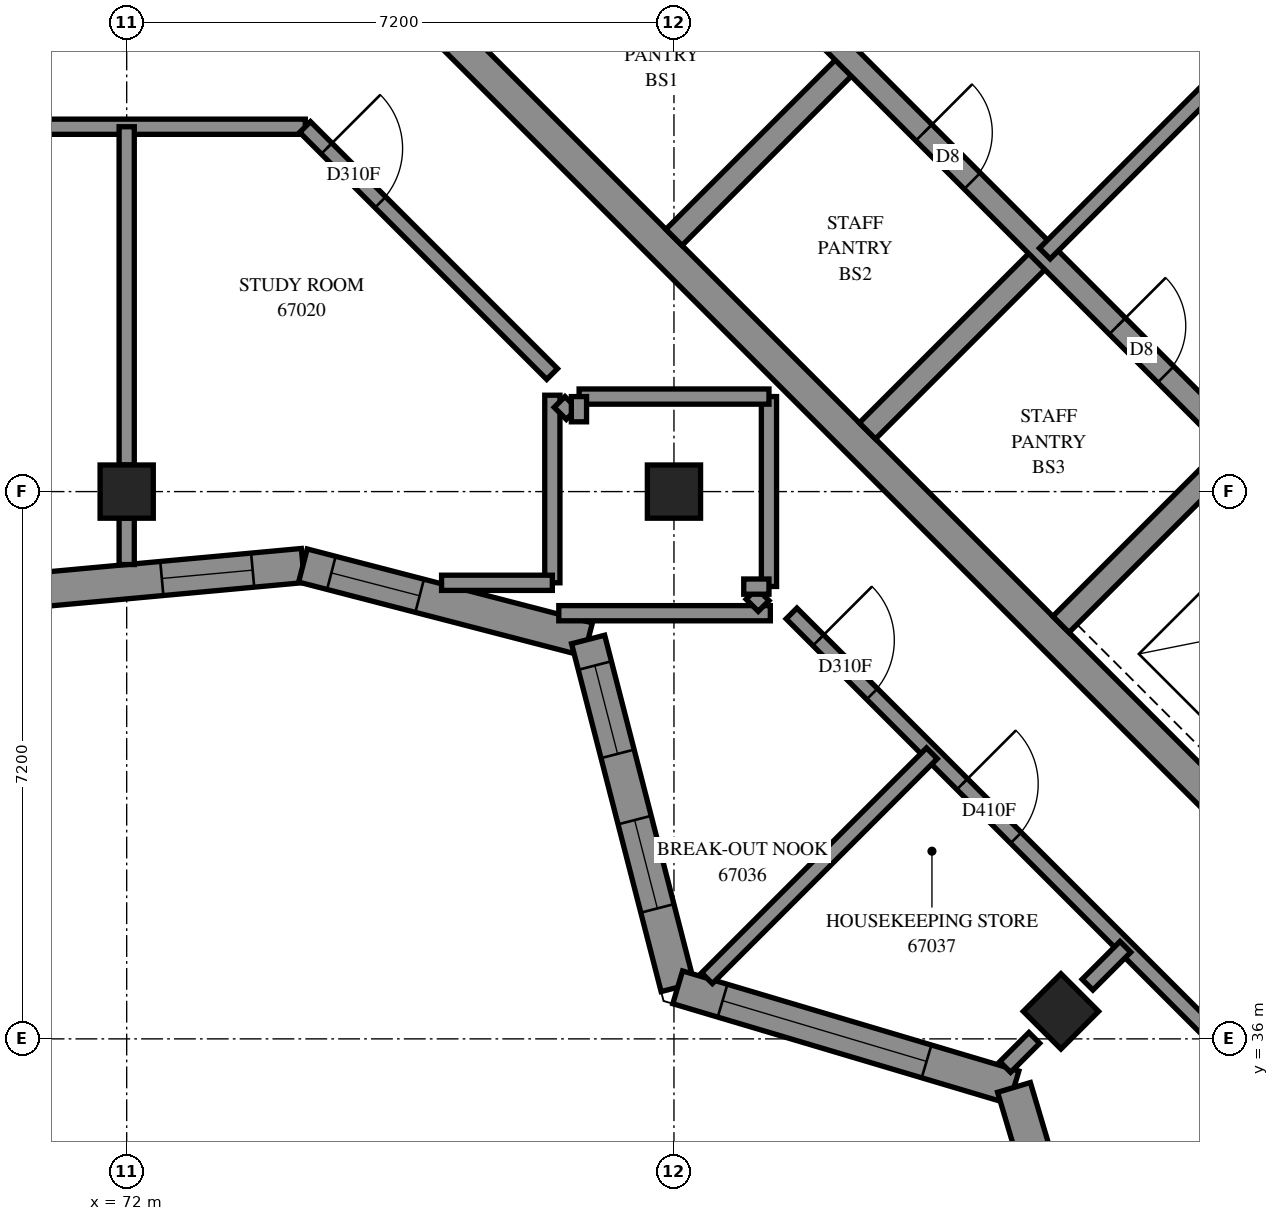
"""IFC4 building model, lengths in metres.
Left out: names, types, materials, properties, quantities, classifications, styles, units other than length and angle.
Written with IfcOpenShell. Run it as: python <this file> out.ifc"""

import sys

from ifc_helpers import new_model, si_unit, direction, frame, frame_2d, origin, origin_2d, place, context, subcontext, project, spatial, polyline, rectangle, outline, extrude, element, fill, save


model = new_model("IFC4")
c1 = context("Model", 3, precision=1e-05, world=origin(), true_north=direction((0.0, 1.0)))
c2 = subcontext(c1, "Body", "Model", "MODEL_VIEW")
j1 = project(units=[si_unit("LENGTHUNIT", "METRE"), si_unit("PLANEANGLEUNIT", "RADIAN")], contexts=[c1])
p1 = place(None, origin())
s1 = spatial("IfcSite", under=j1, at=p1, CompositionType="ELEMENT")
p2 = place(p1, origin())
s2 = spatial("IfcBuilding", under=s1, at=p2, CompositionType="ELEMENT")
p3 = place(p2, frame((0.0, 0.0, 247.2)))
s3 = spatial("IfcBuildingStorey", under=s2, at=p3, CompositionType="ELEMENT", Elevation=247.2)
for number, where, z_axis, x_axis in (
    (1, (72.0, 43.2, 0.0), (0.0, 0.0, 1.0), (1.0, 0.0, 0.0)),
    (2, (79.2, 43.2, 0.0), (0.0, 0.0, 1.0), (1.0, 0.0, 0.0)),
    (3, (84.291, 36.362, 0.0), (0.0, 0.0, 1.0), (0.707, -0.707, 0.0)),
):
    element("IfcColumn", number, at=place(p3, frame(where, z_axis=z_axis, x_axis=x_axis)), inside=s3, PredefinedType="COLUMN", context=c2, shape_type="SweptSolid", body=[
        extrude(rectangle(XDim=0.7, YDim=0.7, at=origin_2d()), origin(), (0.0, 0.0, 1.0), 3.1),
    ])
p4 = place(p3, frame((76.23, 49.231, -0.3), z_axis=(0.0, 0.0, 1.0), x_axis=(0.7071034917, -0.7071100706, 0.0)))
e4 = element("IfcWall", 4, at=p4, inside=s3, PredefinedType="SHEAR", context=c2, shape_type="SweptSolid", body=[
    extrude(rectangle(XDim=15.2, YDim=0.4, at=frame_2d((7.6, 0.0))), origin(), (0.0, 0.0, 1.0), 2.7),
])
p5 = place(p3, frame((79.2, 46.544, 0.0), z_axis=(0.0, 0.0, 1.0), x_axis=(0.7071219326, 0.7070916295, 0.0)))
e5 = element("IfcWall", 5, at=p5, inside=s3, PredefinedType="SOLIDWALL", context=c2, shape_type="SweptSolid", body=[
    extrude(rectangle(XDim=3.3, YDim=0.3, at=frame_2d((1.65, 0.0))), origin(), (0.0, 0.0, 1.0), 3.1),
])
for number, where, z_axis, x_axis in (
    (6, (81.746, 43.999, 0.0), (0.0, 0.0, 1.0), (0.707, 0.707, 0.0)),
    (7, (84.291, 41.453, 0.0), (0.0, 0.0, 1.0), (0.707, 0.707, 0.0)),
):
    element("IfcWall", number, at=place(p3, frame(where, z_axis=z_axis, x_axis=x_axis)), inside=s3, PredefinedType="SOLIDWALL", context=c2, shape_type="SweptSolid", body=[
        extrude(rectangle(XDim=3.3, YDim=0.3, at=frame_2d((1.65, 0.0))), origin(), (0.0, 0.0, 1.0), 3.1),
    ])
p6 = place(p3, frame((78.988, 51.423, 0.0), z_axis=(0.0, 0.0, 1.0), x_axis=(0.7071067812, -0.7071067812, 0.0)))
e8 = element("IfcWall", 8, at=p6, inside=s3, PredefinedType="SOLIDWALL", context=c2, shape_type="SweptSolid", body=[
    extrude(rectangle(XDim=14.4, YDim=0.3, at=frame_2d((7.2, 0.0))), origin(), (0.0, 0.0, 1.0), 3.1),
])
p7 = place(p6, frame((1.35, 0.0, 0.0)))
e9 = element("IfcOpeningElement", 9, at=p7, cuts=e8, PredefinedType="OPENING", context=c2, shape_type="SweptSolid", body=[
    extrude(rectangle(XDim=0.9, YDim=2.1, at=frame_2d((0.45, 1.05))), frame((0.0, 0.16, 0.0), z_axis=(0.0, -1.0, 0.0), x_axis=(1.0, 0.0, 0.0)), (0.0, 0.0, 1.0), 0.32),
])
p8 = place(p6, frame((4.95, 0.0, 0.0)))
e10 = element("IfcOpeningElement", 10, at=p8, cuts=e8, PredefinedType="OPENING", context=c2, shape_type="SweptSolid", body=[
    extrude(rectangle(XDim=0.9, YDim=2.1, at=frame_2d((0.45, 1.05))), frame((0.0, 0.16, 0.0), z_axis=(0.0, -1.0, 0.0), x_axis=(1.0, 0.0, 0.0)), (0.0, 0.0, 1.0), 0.32),
])
p9 = place(p6, frame((8.55, 0.0, 0.0)))
e11 = element("IfcOpeningElement", 11, at=p9, cuts=e8, PredefinedType="OPENING", context=c2, shape_type="SweptSolid", body=[
    extrude(rectangle(XDim=0.9, YDim=2.1, at=frame_2d((0.45, 1.05))), frame((0.0, 0.16, 0.0), z_axis=(0.0, -1.0, 0.0), x_axis=(1.0, 0.0, 0.0)), (0.0, 0.0, 1.0), 0.32),
])
p10 = place(p6, frame((12.05, 0.0, 0.0)))
e12 = element("IfcOpeningElement", 12, at=p10, cuts=e8, PredefinedType="OPENING", context=c2, shape_type="SweptSolid", body=[
    extrude(rectangle(XDim=1.1, YDim=2.1, at=frame_2d((0.55, 1.05))), frame((0.0, 0.16, 0.0), z_axis=(0.0, -1.0, 0.0), x_axis=(1.0, 0.0, 0.0)), (0.0, 0.0, 1.0), 0.32),
])
p11 = place(p3, frame((81.534, 53.969, 0.0), z_axis=(0.0, 0.0, 1.0), x_axis=(0.707103309, -0.7071102534, 0.0)))
e13 = element("IfcWall", 13, at=p11, inside=s3, PredefinedType="SOLIDWALL", context=c2, shape_type="SweptSolid", body=[
    extrude(rectangle(XDim=14.4, YDim=0.3, at=frame_2d((7.2, 0.0))), origin(), (0.0, 0.0, 1.0), 3.1),
])
p12 = place(p11, frame((8.55, 0.0, 0.0)))
e14 = element("IfcOpeningElement", 14, at=p12, cuts=e13, PredefinedType="OPENING", context=c2, shape_type="SweptSolid", body=[
    extrude(rectangle(XDim=0.9, YDim=2.1, at=frame_2d((0.45, 1.05))), frame((0.0, 0.16, 0.0), z_axis=(0.0, -1.0, 0.0), x_axis=(1.0, 0.0, 0.0)), (0.0, 0.0, 1.0), 0.32),
])
p13 = place(p11, frame((1.25, 0.0, 0.0)))
e15 = element("IfcOpeningElement", 15, at=p13, cuts=e13, PredefinedType="OPENING", context=c2, shape_type="SweptSolid", body=[
    extrude(rectangle(XDim=1.1, YDim=2.1, at=frame_2d((0.55, 1.05))), frame((0.0, 0.16, 0.0), z_axis=(0.0, -1.0, 0.0), x_axis=(1.0, 0.0, 0.0)), (0.0, 0.0, 1.0), 0.32),
])
p14 = place(p11, frame((4.85, 0.0, 0.0)))
e16 = element("IfcOpeningElement", 16, at=p14, cuts=e13, PredefinedType="OPENING", context=c2, shape_type="SweptSolid", body=[
    extrude(rectangle(XDim=1.1, YDim=2.1, at=frame_2d((0.55, 1.05))), frame((0.0, 0.16, 0.0), z_axis=(0.0, -1.0, 0.0), x_axis=(1.0, 0.0, 0.0)), (0.0, 0.0, 1.0), 0.32),
])
p15 = place(p11, frame((12.05, 0.0, 0.0)))
e17 = element("IfcOpeningElement", 17, at=p15, cuts=e13, PredefinedType="OPENING", context=c2, shape_type="SweptSolid", body=[
    extrude(rectangle(XDim=1.1, YDim=2.1, at=frame_2d((0.55, 1.05))), frame((0.0, 0.16, 0.0), z_axis=(0.0, -1.0, 0.0), x_axis=(1.0, 0.0, 0.0)), (0.0, 0.0, 1.0), 0.32),
])
p16 = place(p3, frame((70.714, 41.896, 0.0), z_axis=(0.0, 0.0, 1.0), x_axis=(0.9957918129, 0.0916442329, 0.0)))
e18 = element("IfcWall", 18, at=p16, inside=s3, PredefinedType="SOLIDWALL", context=c2, shape_type="SweptSolid", body=[
    extrude(outline(polyline([(-0.021, -0.225), (3.58, -0.225), (3.659, 0.225), (0.021, 0.225), (-0.021, -0.225)])), origin(), (0.0, 0.0, 1.0), 3.1),
])
p17 = place(p16, frame((1.755, 0.0, 0.45)))
e19 = element("IfcOpeningElement", 19, at=p17, cuts=e18, PredefinedType="OPENING", context=c2, shape_type="SweptSolid", body=[
    extrude(rectangle(XDim=1.2, YDim=2.55, at=frame_2d((0.6, 1.275))), frame((0.0, 0.235, 0.0), z_axis=(0.0, -1.0, 0.0), x_axis=(1.0, 0.0, 0.0)), (0.0, 0.0, 1.0), 0.47),
])
p18 = place(p3, frame((74.319, 42.228, 0.0), z_axis=(0.0, 0.0, 1.0), x_axis=(0.9679697349, -0.2510669081, 0.0)))
e20 = element("IfcWall", 20, at=p18, inside=s3, PredefinedType="SOLIDWALL", context=c2, shape_type="SweptSolid", body=[
    extrude(outline(polyline([(0.039, -0.225), (3.744, -0.225), (4.009, 0.225), (-0.039, 0.225), (0.039, -0.225)])), origin(), (0.0, 0.0, 1.0), 3.1),
])
p19 = place(p18, frame((0.387, 0.0, 0.45)))
e21 = element("IfcOpeningElement", 21, at=p19, cuts=e20, PredefinedType="OPENING", context=c2, shape_type="SweptSolid", body=[
    extrude(rectangle(XDim=1.2, YDim=2.55, at=frame_2d((0.6, 1.275))), frame((0.0, 0.235, 0.0), z_axis=(0.0, -1.0, 0.0), x_axis=(1.0, 0.0, 0.0)), (0.0, 0.0, 1.0), 0.47),
])
p20 = place(p3, frame((78.071, 41.255, 0.0), z_axis=(0.0, 0.0, 1.0), x_axis=(0.2493659813, -0.9684093181, 0.0)))
e22 = element("IfcWall", 22, at=p20, inside=s3, PredefinedType="SOLIDWALL", context=c2, shape_type="SweptSolid", body=[
    extrude(outline(polyline([(0.133, -0.225), (4.853, -0.225), (4.598, 0.225), (-0.133, 0.225), (0.133, -0.225)])), origin(), (0.0, 0.0, 1.0), 3.1),
])
p21 = place(p20, frame((0.354, 0.0, 0.45)))
e23 = element("IfcOpeningElement", 23, at=p21, cuts=e22, PredefinedType="OPENING", context=c2, shape_type="SweptSolid", body=[
    extrude(rectangle(XDim=1.2, YDim=2.55, at=frame_2d((0.6, 1.275))), frame((0.0, 0.235, 0.0), z_axis=(0.0, -1.0, 0.0), x_axis=(1.0, 0.0, 0.0)), (0.0, 0.0, 1.0), 0.47),
])
p22 = place(p20, frame((2.453, 0.0, 0.45)))
e24 = element("IfcOpeningElement", 24, at=p22, cuts=e22, PredefinedType="OPENING", context=c2, shape_type="SweptSolid", body=[
    extrude(rectangle(XDim=1.2, YDim=2.55, at=frame_2d((0.6, 1.275))), frame((0.0, 0.235, 0.0), z_axis=(0.0, -1.0, 0.0), x_axis=(1.0, 0.0, 0.0)), (0.0, 0.0, 1.0), 0.47),
])
p23 = place(p3, frame((79.249, 36.678, 0.0), z_axis=(0.0, 0.0, 1.0), x_axis=(0.9584470724, -0.2852704146, 0.0)))
e25 = element("IfcWall", 25, at=p23, inside=s3, PredefinedType="SOLIDWALL", context=c2, shape_type="SweptSolid", body=[
    extrude(outline(polyline([(-0.127, -0.225), (4.495, -0.225), (4.738, 0.225), (0.127, 0.225), (-0.127, -0.225)])), origin(), (0.0, 0.0, 1.0), 3.1),
])
p24 = place(p23, frame((0.616, 0.0, 0.45)))
e26 = element("IfcOpeningElement", 26, at=p24, cuts=e25, PredefinedType="OPENING", context=c2, shape_type="SweptSolid", body=[
    extrude(rectangle(XDim=2.8, YDim=2.55, at=frame_2d((1.4, 1.275))), frame((0.0, 0.235, 0.0), z_axis=(0.0, -1.0, 0.0), x_axis=(1.0, 0.0, 0.0)), (0.0, 0.0, 1.0), 0.47),
])
p25 = place(p3, frame((83.674, 35.361, 0.0), z_axis=(0.0, 0.0, 1.0), x_axis=(0.2852704146, -0.9584470724, 0.0)))
e27 = element("IfcWall", 27, at=p25, inside=s3, PredefinedType="SOLIDWALL", context=c2, shape_type="SweptSolid", body=[
    extrude(outline(polyline([(0.122, -0.225), (4.744, -0.225), (4.489, 0.225), (-0.122, 0.225), (0.122, -0.225)])), origin(), (0.0, 0.0, 1.0), 3.1),
])
p26 = place(p25, frame((1.045, 0.0, 0.45)))
e28 = element("IfcOpeningElement", 28, at=p26, cuts=e27, PredefinedType="OPENING", context=c2, shape_type="SweptSolid", body=[
    extrude(rectangle(XDim=1.2, YDim=2.55, at=frame_2d((0.6, 1.275))), frame((0.0, 0.235, 0.0), z_axis=(0.0, -1.0, 0.0), x_axis=(1.0, 0.0, 0.0)), (0.0, 0.0, 1.0), 0.47),
])
p27 = place(p3, frame((84.079, 46.332, 0.0), z_axis=(0.0, 0.0, 1.0), x_axis=(0.7071067812, 0.7071067812, 0.0)))
e29 = element("IfcWall", 29, at=p27, inside=s3, PredefinedType="PARTITIONING", context=c2, shape_type="SweptSolid", body=[
    extrude(rectangle(XDim=3.6, YDim=0.2, at=frame_2d((1.8, 0.0))), origin(), (0.0, 0.0, 1.0), 3.1),
])
p28 = place(p3, frame((55.2, 48.0, 0.0), z_axis=(0.0, 0.0, 1.0), x_axis=(1.0, 0.0, 0.0)))
e30 = element("IfcWall", 30, at=p28, inside=s3, PredefinedType="PARTITIONING", context=c2, shape_type="SweptSolid", body=[
    extrude(rectangle(XDim=19.15, YDim=0.2, at=frame_2d((9.575, 0.0))), origin(), (0.0, 0.0, 1.0), 3.1),
])
p29 = place(p28, frame((6.299, 0.0, 0.0)))
e31 = element("IfcOpeningElement", 31, at=p29, cuts=e30, PredefinedType="OPENING", context=c2, shape_type="SweptSolid", body=[
    extrude(rectangle(XDim=0.9, YDim=2.1, at=frame_2d((0.45, 1.05))), frame((0.0, 0.11, 0.0), z_axis=(0.0, -1.0, 0.0), x_axis=(1.0, 0.0, 0.0)), (0.0, 0.0, 1.0), 0.22),
])
p30 = place(p28, frame((13.499, 0.0, 0.0)))
e32 = element("IfcOpeningElement", 32, at=p30, cuts=e30, PredefinedType="OPENING", context=c2, shape_type="SweptSolid", body=[
    extrude(rectangle(XDim=0.9, YDim=2.1, at=frame_2d((0.45, 1.05))), frame((0.0, 0.11, 0.0), z_axis=(0.0, -1.0, 0.0), x_axis=(1.0, 0.0, 0.0)), (0.0, 0.0, 1.0), 0.22),
])
p31 = place(p3, frame((84.934, 31.915, 0.0), z_axis=(0.0, 0.0, 1.0), x_axis=(0.7071067812, 0.7071067812, 0.0)))
e33 = element("IfcWall", 33, at=p31, inside=s3, PredefinedType="PARTITIONING", context=c2, shape_type="SweptSolid", body=[
    extrude(rectangle(XDim=11.29, YDim=0.2, at=frame_2d((5.645, 0.0))), origin(), (0.0, 0.0, 1.0), 3.1),
])
p32 = place(p3, frame((80.747, 41.597, 0.0), z_axis=(0.0, 0.0, 1.0), x_axis=(0.7071067812, -0.7071067812, 0.0)))
e34 = element("IfcWall", 34, at=p32, inside=s3, PredefinedType="PARTITIONING", context=c2, shape_type="SweptSolid", body=[
    extrude(rectangle(XDim=8.607, YDim=0.2, at=frame_2d((4.303, 0.0))), origin(), (0.0, 0.0, 1.0), 3.1),
])
p33 = place(p32, frame((0.498, 0.0, 0.0)))
e35 = element("IfcOpeningElement", 35, at=p33, cuts=e34, PredefinedType="OPENING", context=c2, shape_type="SweptSolid", body=[
    extrude(rectangle(XDim=1.0, YDim=2.1, at=frame_2d((0.5, 1.05))), frame((0.0, 0.11, 0.0), z_axis=(0.0, -1.0, 0.0), x_axis=(1.0, 0.0, 0.0)), (0.0, 0.0, 1.0), 0.22),
])
p34 = place(p32, frame((3.175, 0.0, 0.0)))
e36 = element("IfcOpeningElement", 36, at=p34, cuts=e34, PredefinedType="OPENING", context=c2, shape_type="SweptSolid", body=[
    extrude(rectangle(XDim=1.0, YDim=2.1, at=frame_2d((0.5, 1.05))), frame((0.0, 0.11, 0.0), z_axis=(0.0, -1.0, 0.0), x_axis=(1.0, 0.0, 0.0)), (0.0, 0.0, 1.0), 0.22),
])
p35 = place(p3, frame((74.347, 47.997, 0.0), z_axis=(0.0, 0.0, 1.0), x_axis=(0.7071067812, -0.7071067812, 0.0)))
e37 = element("IfcWall", 37, at=p35, inside=s3, PredefinedType="PARTITIONING", context=c2, shape_type="SweptSolid", body=[
    extrude(rectangle(XDim=4.596, YDim=0.2, at=frame_2d((2.298, 0.0))), origin(), (0.0, 0.0, 1.0), 3.1),
])
p36 = place(p35, frame((0.401, 0.0, 0.0)))
e38 = element("IfcOpeningElement", 38, at=p36, cuts=e37, PredefinedType="OPENING", context=c2, shape_type="SweptSolid", body=[
    extrude(rectangle(XDim=1.0, YDim=2.1, at=frame_2d((0.5, 1.05))), frame((0.0, 0.11, 0.0), z_axis=(0.0, -1.0, 0.0), x_axis=(1.0, 0.0, 0.0)), (0.0, 0.0, 1.0), 0.22),
])
p37 = place(p3, frame((72.0, 43.55, 0.0), z_axis=(0.0, 0.0, 1.0), x_axis=(0.0, 1.0, 0.0)))
e39 = element("IfcWall", 39, at=p37, inside=s3, PredefinedType="PARTITIONING", context=c2, shape_type="SweptSolid", body=[
    extrude(rectangle(XDim=4.45, YDim=0.2, at=frame_2d((2.225, 0.0))), origin(), (0.0, 0.0, 1.0), 3.1),
])
p38 = place(p3, frame((79.635, 36.798, 0.0), z_axis=(0.0, 0.0, 1.0), x_axis=(0.7071187313, 0.7070948309, 0.0)))
e40 = element("IfcWall", 40, at=p38, inside=s3, PredefinedType="PARTITIONING", context=c2, shape_type="SweptSolid", body=[
    extrude(rectangle(XDim=4.184, YDim=0.2, at=frame_2d((2.092, 0.0))), origin(), (0.0, 0.0, 1.0), 3.1),
])
p39 = place(p3, frame((77.685, 41.6, 0.0), z_axis=(0.0, 0.0, 1.0), x_axis=(1.0, 0.0, 0.0)))
e41 = element("IfcWall", 41, at=p39, inside=s3, PredefinedType="PARTITIONING", context=c2, shape_type="SweptSolid", body=[
    extrude(rectangle(XDim=2.783, YDim=0.2, at=frame_2d((1.392, 0.0))), origin(), (0.0, 0.0, 1.0), 3.1),
])
for number, where, z_axis, x_axis in (
    (42, (80.45, 41.952, 0.0), (0.0, 0.0, 1.0), (0.0, 1.0, 0.0)),
    (43, (77.952, 44.45, 0.0), (0.0, 0.0, 1.0), (1.0, 0.0, 0.0)),
):
    element("IfcWall", number, at=place(p3, frame(where, z_axis=z_axis, x_axis=x_axis)), inside=s3, PredefinedType="PARTITIONING", context=c2, shape_type="SweptSolid", body=[
        extrude(rectangle(XDim=2.498, YDim=0.2, at=frame_2d((1.249, 0.0))), origin(), (0.0, 0.0, 1.0), 3.1),
    ])
p40 = place(p3, frame((77.6, 42.0, 0.0), z_axis=(0.0, 0.0, 1.0), x_axis=(0.0, 1.0, 0.0)))
e44 = element("IfcWall", 44, at=p40, inside=s3, PredefinedType="PARTITIONING", context=c2, shape_type="SweptSolid", body=[
    extrude(rectangle(XDim=2.468, YDim=0.2, at=frame_2d((1.234, 0.0))), origin(), (0.0, 0.0, 1.0), 3.1),
])
p41 = place(p3, frame((76.143, 42.0, 0.0), z_axis=(0.0, 0.0, 1.0), x_axis=(1.0, 0.0, 0.0)))
e45 = element("IfcWall", 45, at=p41, inside=s3, PredefinedType="PARTITIONING", context=c2, shape_type="SweptSolid", body=[
    extrude(rectangle(XDim=1.457, YDim=0.2, at=frame_2d((0.729, 0.0))), origin(), (0.0, 0.0, 1.0), 3.1),
])
p42 = place(p3, frame((84.641, 36.713, 0.0), z_axis=(0.0, 0.0, 1.0), x_axis=(0.7071067812, 0.7071067812, 0.0)))
e46 = element("IfcWall", 46, at=p42, inside=s3, PredefinedType="PARTITIONING", context=c2, shape_type="SweptSolid", body=[
    extrude(rectangle(XDim=0.704, YDim=0.2, at=frame_2d((0.352, 0.0))), origin(), (0.0, 0.0, 1.0), 3.1),
])
p43 = place(p3, frame((72.0, 42.24, 0.0), z_axis=(0.0, 0.0, 1.0), x_axis=(0.0, 1.0, 0.0)))
e47 = element("IfcWall", 47, at=p43, inside=s3, PredefinedType="PARTITIONING", context=c2, shape_type="SweptSolid", body=[
    extrude(rectangle(XDim=0.61, YDim=0.2, at=frame_2d((0.305, 0.0))), origin(), (0.0, 0.0, 1.0), 3.1),
])
for number, where, z_axis, x_axis in (
    (48, (80.221, 41.855, 0.0), (0.0, 0.0, 1.0), (0.707, -0.707, 0.0)),
    (49, (77.695, 44.38, 0.0), (0.0, 0.0, 1.0), (0.707, -0.707, 0.0)),
):
    element("IfcWall", number, at=place(p3, frame(where, z_axis=z_axis, x_axis=x_axis)), inside=s3, PredefinedType="PARTITIONING", context=c2, shape_type="SweptSolid", body=[
        extrude(rectangle(XDim=0.225, YDim=0.2, at=frame_2d((0.112, 0.0))), origin(), (0.0, 0.0, 1.0), 3.1),
    ])
p44 = place(p3, frame((83.558, 35.63, 0.0), z_axis=(0.0, 0.0, 1.0), x_axis=(0.7070144033, 0.707199147, 0.0)))
e50 = element("IfcWall", 50, at=p44, inside=s3, PredefinedType="PARTITIONING", context=c2, shape_type="SweptSolid", body=[
    extrude(rectangle(XDim=0.541, YDim=0.2, at=frame_2d((0.271, 0.0))), origin(), (0.0, 0.0, 1.0), 3.1),
])
for number, where, z_axis, x_axis in (
    (51, (80.118, 41.95, 0.0), (0.0, 0.0, 1.0), (1.0, 0.0, 0.0)),
    (52, (77.95, 44.118, 0.0), (0.0, 0.0, 1.0), (0.0, 1.0, 0.0)),
):
    element("IfcWall", number, at=place(p3, frame(where, z_axis=z_axis, x_axis=x_axis)), inside=s3, PredefinedType="PARTITIONING", context=c2, shape_type="SweptSolid", body=[
        extrude(rectangle(XDim=0.332, YDim=0.2, at=frame_2d((0.166, 0.0))), origin(), (0.0, 0.0, 1.0), 3.1),
    ])
p45 = place(p17, origin())
e53 = element("IfcWindow", 53, at=p45, inside=s3, PartitioningType="SINGLE_PANEL", PredefinedType="WINDOW", context=c2, shape_type="SweptSolid", body=[
    extrude(rectangle(XDim=1.2, YDim=2.55, at=frame_2d((0.6, 1.275))), frame((0.0, 0.205, 0.0), z_axis=(0.0, -1.0, 0.0), x_axis=(1.0, 0.0, 0.0)), (0.0, 0.0, 1.0), 0.06),
])
fill(e19, e53)
p46 = place(p21, origin())
e54 = element("IfcWindow", 54, at=p46, inside=s3, PartitioningType="SINGLE_PANEL", PredefinedType="WINDOW", context=c2, shape_type="SweptSolid", body=[
    extrude(rectangle(XDim=1.2, YDim=2.55, at=frame_2d((0.6, 1.275))), frame((0.0, 0.205, 0.0), z_axis=(0.0, -1.0, 0.0), x_axis=(1.0, 0.0, 0.0)), (0.0, 0.0, 1.0), 0.06),
])
fill(e23, e54)
p47 = place(p22, origin())
e55 = element("IfcWindow", 55, at=p47, inside=s3, PartitioningType="SINGLE_PANEL", PredefinedType="WINDOW", context=c2, shape_type="SweptSolid", body=[
    extrude(rectangle(XDim=1.2, YDim=2.55, at=frame_2d((0.6, 1.275))), frame((0.0, 0.205, 0.0), z_axis=(0.0, -1.0, 0.0), x_axis=(1.0, 0.0, 0.0)), (0.0, 0.0, 1.0), 0.06),
])
fill(e24, e55)
p48 = place(p24, origin())
e56 = element("IfcWindow", 56, at=p48, inside=s3, PartitioningType="SINGLE_PANEL", PredefinedType="WINDOW", context=c2, shape_type="SweptSolid", body=[
    extrude(rectangle(XDim=2.8, YDim=2.55, at=frame_2d((1.4, 1.275))), frame((0.0, 0.205, 0.0), z_axis=(0.0, -1.0, 0.0), x_axis=(1.0, 0.0, 0.0)), (0.0, 0.0, 1.0), 0.06),
])
fill(e26, e56)
p49 = place(p8, origin())
e57 = element("IfcDoor", 57, at=p49, inside=s3, OperationType="SINGLE_SWING_LEFT", PredefinedType="DOOR", context=c2, shape_type="SweptSolid", body=[
    extrude(rectangle(XDim=0.9, YDim=2.1, at=frame_2d((0.45, 1.05))), frame((0.0, 0.025, 0.0), z_axis=(0.0, -1.0, 0.0), x_axis=(1.0, 0.0, 0.0)), (0.0, 0.0, 1.0), 0.05),
])
fill(e10, e57)
p50 = place(p9, origin())
e58 = element("IfcDoor", 58, at=p50, inside=s3, OperationType="SINGLE_SWING_LEFT", PredefinedType="DOOR", context=c2, shape_type="SweptSolid", body=[
    extrude(rectangle(XDim=0.9, YDim=2.1, at=frame_2d((0.45, 1.05))), frame((0.0, 0.025, 0.0), z_axis=(0.0, -1.0, 0.0), x_axis=(1.0, 0.0, 0.0)), (0.0, 0.0, 1.0), 0.05),
])
fill(e11, e58)
p51 = place(p36, origin())
e59 = element("IfcDoor", 59, at=p51, inside=s3, OperationType="SINGLE_SWING_LEFT", PredefinedType="DOOR", context=c2, shape_type="SweptSolid", body=[
    extrude(rectangle(XDim=1.0, YDim=2.1, at=frame_2d((0.5, 1.05))), frame((0.0, 0.025, 0.0), z_axis=(0.0, -1.0, 0.0), x_axis=(1.0, 0.0, 0.0)), (0.0, 0.0, 1.0), 0.05),
])
fill(e38, e59)
p52 = place(p33, origin())
e60 = element("IfcDoor", 60, at=p52, inside=s3, OperationType="SINGLE_SWING_RIGHT", PredefinedType="DOOR", context=c2, shape_type="SweptSolid", body=[
    extrude(rectangle(XDim=1.0, YDim=2.1, at=frame_2d((0.5, 1.05))), frame((0.0, 0.025, 0.0), z_axis=(0.0, -1.0, 0.0), x_axis=(1.0, 0.0, 0.0)), (0.0, 0.0, 1.0), 0.05),
])
fill(e35, e60)
p53 = place(p34, origin())
e61 = element("IfcDoor", 61, at=p53, inside=s3, OperationType="SINGLE_SWING_LEFT", PredefinedType="DOOR", context=c2, shape_type="SweptSolid", body=[
    extrude(rectangle(XDim=1.0, YDim=2.1, at=frame_2d((0.5, 1.05))), frame((0.0, 0.025, 0.0), z_axis=(0.0, -1.0, 0.0), x_axis=(1.0, 0.0, 0.0)), (0.0, 0.0, 1.0), 0.05),
])
fill(e36, e61)
p54 = place(p19, origin())
e62 = element("IfcWindow", 62, at=p54, inside=s3, PartitioningType="SINGLE_PANEL", PredefinedType="WINDOW", context=c2, shape_type="SweptSolid", body=[
    extrude(rectangle(XDim=1.2, YDim=2.55, at=frame_2d((0.6, 1.275))), frame((0.0, 0.205, 0.0), z_axis=(0.0, -1.0, 0.0), x_axis=(1.0, 0.0, 0.0)), (0.0, 0.0, 1.0), 0.06),
])
fill(e21, e62)
save(model, sys.argv[1])
